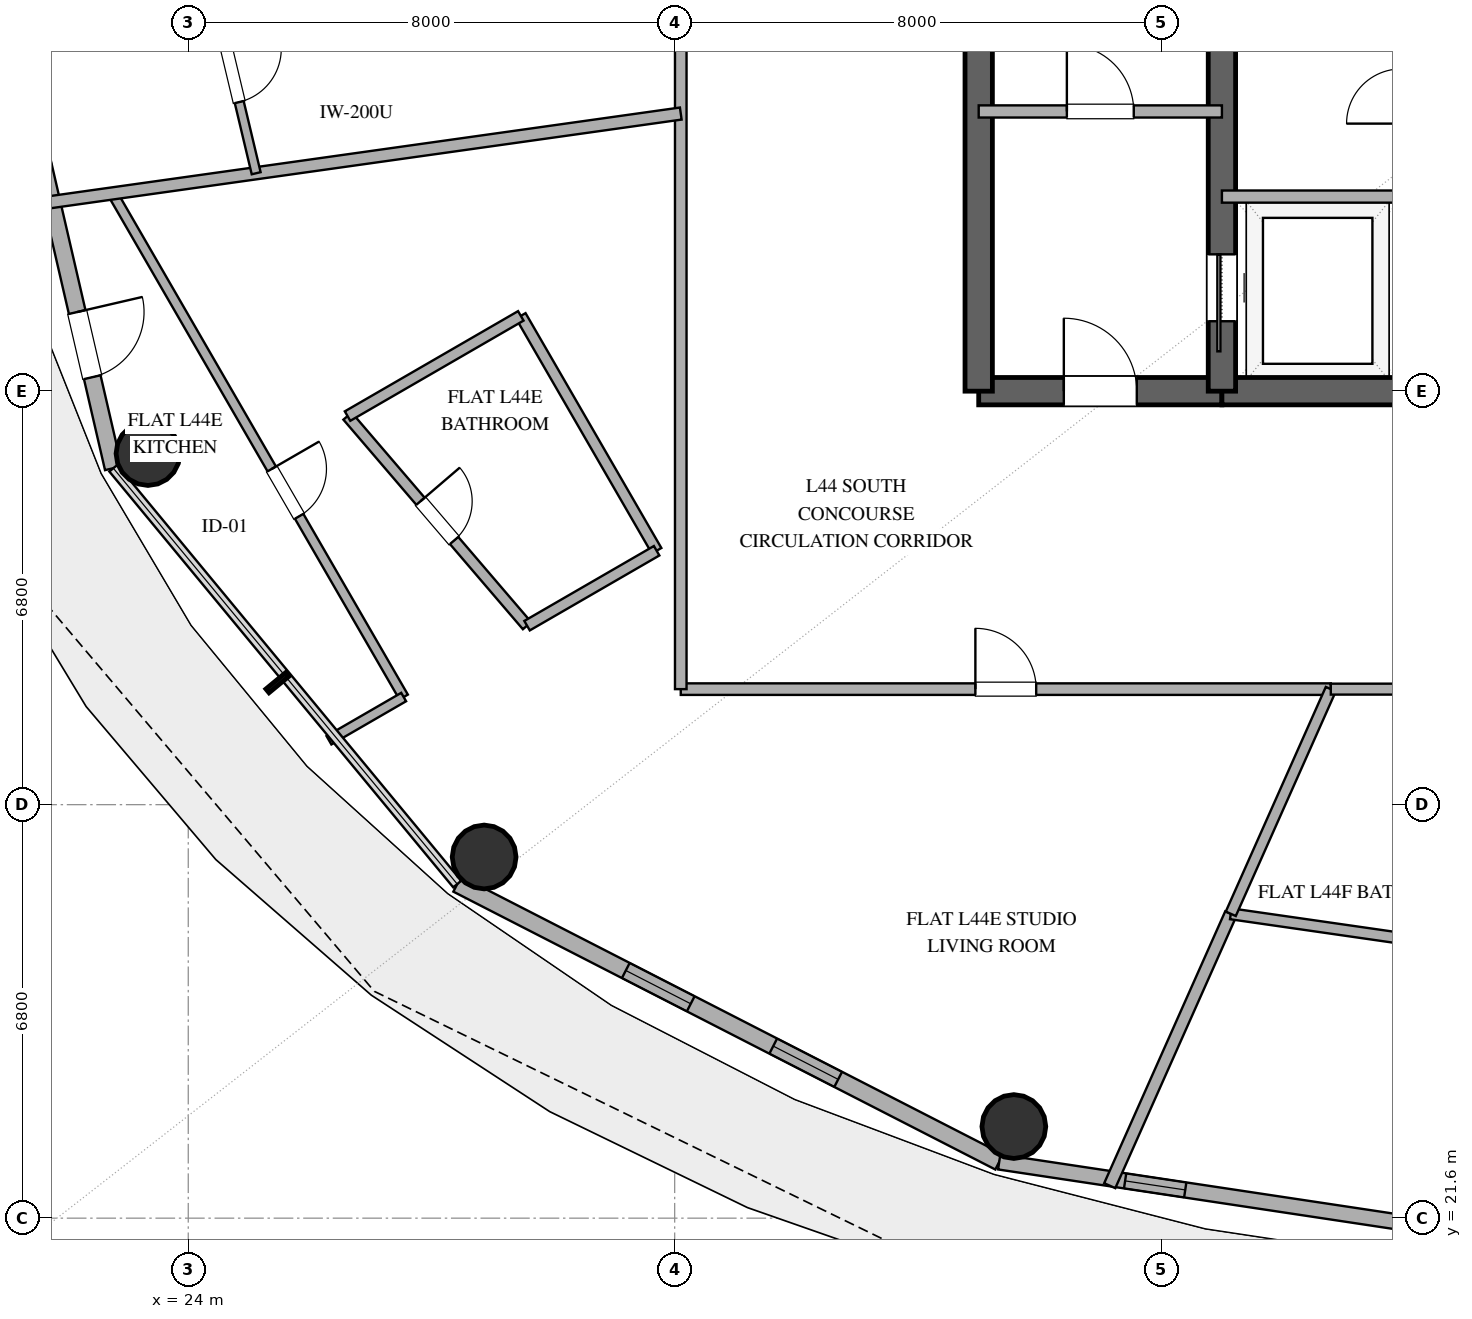
"""IFC4 building model, lengths in metres.
Left out: names, types, materials, properties, quantities, classifications, styles, units other than length and angle.
Written with IfcOpenShell. Run it as: python <this file> out.ifc"""

import sys

from ifc_helpers import new_model, si_unit, direction, frame, frame_2d, origin, origin_2d, place, context, subcontext, project, spatial, rectangle, hollow_circle, extrude, element, fill, save


model = new_model("IFC4")
c1 = context("Model", 3, precision=1e-05, world=origin(), true_north=direction((0.0, 1.0)))
c2 = subcontext(c1, "Body", "Model", "MODEL_VIEW")
j1 = project(units=[si_unit("LENGTHUNIT", "METRE"), si_unit("PLANEANGLEUNIT", "RADIAN")], contexts=[c1])
p1 = place(None, origin())
s1 = spatial("IfcSite", under=j1, at=p1, CompositionType="ELEMENT")
p2 = place(p1, origin())
s2 = spatial("IfcBuilding", under=s1, at=p2, CompositionType="ELEMENT")
p3 = place(p2, frame((0.0, 0.0, 175.8)))
s3 = spatial("IfcBuildingStorey", under=s2, at=p3, CompositionType="ELEMENT", Elevation=175.8)
p4 = place(p3, frame((37.0, 35.2, 0.0), z_axis=(0.0, 0.0, 1.0), x_axis=(1.0, 0.0, 0.0)))
e1 = element("IfcWall", 1, at=p4, inside=s3, PredefinedType="SHEAR", context=c2, shape_type="SweptSolid", body=[
    extrude(rectangle(XDim=4.0, YDim=0.45, at=frame_2d((2.0, 0.0))), origin(), (0.0, 0.0, 1.0), 3.38),
])
p5 = place(p4, frame((1.4, 0.0, 0.0)))
e2 = element("IfcOpeningElement", 2, at=p5, cuts=e1, PredefinedType="OPENING", context=c2, shape_type="SweptSolid", body=[
    extrude(rectangle(XDim=1.2, YDim=2.15, at=frame_2d((0.6, 1.075))), frame((0.0, 0.235, 0.0), z_axis=(0.0, -1.0, 0.0), x_axis=(1.0, 0.0, 0.0)), (0.0, 0.0, 1.0), 0.47),
])
p6 = place(p3, frame((41.0, 35.2, 0.0), z_axis=(0.0, 0.0, 1.0), x_axis=(1.0, 0.0, 0.0)))
e3 = element("IfcWall", 3, at=p6, inside=s3, PredefinedType="SHEAR", context=c2, shape_type="SweptSolid", body=[
    extrude(rectangle(XDim=14.0, YDim=0.45, at=frame_2d((7.0, 0.0))), origin(), (0.0, 0.0, 1.0), 3.38),
])
p7 = place(p6, frame((6.1, 0.0, 0.0)))
e4 = element("IfcOpeningElement", 4, at=p7, cuts=e3, PredefinedType="OPENING", context=c2, shape_type="SweptSolid", body=[
    extrude(rectangle(XDim=1.8, YDim=2.25, at=frame_2d((0.9, 1.125))), frame((0.0, 0.235, 0.0), z_axis=(0.0, -1.0, 0.0), x_axis=(1.0, 0.0, 0.0)), (0.0, 0.0, 1.0), 0.47),
])
p8 = place(p3, frame((37.0, 35.2, 0.0), z_axis=(0.0, 0.0, 1.0), x_axis=(0.0, 1.0, 0.0)))
e5 = element("IfcWall", 5, at=p8, inside=s3, PredefinedType="SHEAR", context=c2, shape_type="SweptSolid", body=[
    extrude(rectangle(XDim=13.6, YDim=0.45, at=frame_2d((6.8, 0.0))), origin(), (0.0, 0.0, 1.0), 3.38),
])
p9 = place(p3, frame((41.0, 35.2, 0.0), z_axis=(0.0, 0.0, 1.0), x_axis=(0.0, 1.0, 0.0)))
e6 = element("IfcWall", 6, at=p9, inside=s3, PredefinedType="SHEAR", context=c2, shape_type="SweptSolid", body=[
    extrude(rectangle(XDim=13.6, YDim=0.45, at=frame_2d((6.8, 0.0))), origin(), (0.0, 0.0, 1.0), 3.38),
])
p10 = place(p9, frame((1.15, 0.0, 0.0)))
e7 = element("IfcOpeningElement", 7, at=p10, cuts=e6, PredefinedType="OPENING", context=c2, shape_type="SweptSolid", body=[
    extrude(rectangle(XDim=1.1, YDim=2.2, at=frame_2d((0.55, 1.1))), frame((0.0, 0.235, 0.0), z_axis=(0.0, -1.0, 0.0), x_axis=(1.0, 0.0, 0.0)), (0.0, 0.0, 1.0), 0.47),
])
for number, where, z_axis, x_axis in (
    (8, (23.338, 34.174, 0.0), (0.0, 0.0, 1.0), (1.0, 0.0, 0.0)),
    (9, (28.866, 27.54, 0.0), (0.0, 0.0, 1.0), (1.0, 0.0, 0.0)),
    (10, (37.578, 23.107, 0.0), (0.0, 0.0, 1.0), (1.0, 0.0, 0.0)),
):
    element("IfcColumn", number, at=place(p3, frame(where, z_axis=z_axis, x_axis=x_axis)), inside=s3, PredefinedType="COLUMN", context=c2, shape_type="SweptSolid", body=[
        extrude(hollow_circle(Radius=0.525, WallThickness=0.028, at=origin_2d()), origin(), (0.0, 0.0, 1.0), 3.38),
    ])
p11 = place(p3, frame((20.901, 42.0, 0.0), z_axis=(0.0, 0.0, 1.0), x_axis=(0.225473184558, -0.974249374157, 0.0)))
e11 = element("IfcWall", 11, at=p11, inside=s3, PredefinedType="SOLIDWALL", context=c2, shape_type="SweptSolid", body=[
    extrude(rectangle(XDim=8.28, YDim=0.28, at=frame_2d((4.14, 0.0))), origin(), (0.0, 0.0, 1.0), 3.38),
])
p12 = place(p11, frame((1.857, 0.0, 0.85)))
e12 = element("IfcOpeningElement", 12, at=p12, cuts=e11, PredefinedType="OPENING", context=c2, shape_type="SweptSolid", body=[
    extrude(rectangle(XDim=1.35, YDim=1.8, at=frame_2d((0.675, 0.9))), frame((0.0, 0.15, 0.0), z_axis=(0.0, -1.0, 0.0), x_axis=(1.0, 0.0, 0.0)), (0.0, 0.0, 1.0), 0.3),
])
p13 = place(p11, frame((5.644, 0.0, 0.0)))
e13 = element("IfcOpeningElement", 13, at=p13, cuts=e11, PredefinedType="OPENING", context=c2, shape_type="SweptSolid", body=[
    extrude(rectangle(XDim=1.1, YDim=2.25, at=frame_2d((0.55, 1.125))), frame((0.0, 0.15, 0.0), z_axis=(0.0, -1.0, 0.0), x_axis=(1.0, 0.0, 0.0)), (0.0, 0.0, 1.0), 0.3),
])
p14 = place(p3, frame((28.424, 27.094, 0.0), z_axis=(0.0, 0.0, 1.0), x_axis=(0.889872523182, -0.456209263919, 0.0)))
e14 = element("IfcWall", 14, at=p14, inside=s3, PredefinedType="SOLIDWALL", context=c2, shape_type="SweptSolid", body=[
    extrude(rectangle(XDim=10.016, YDim=0.28, at=frame_2d((5.008, 0.0))), origin(), (0.0, 0.0, 1.0), 3.38),
])
p15 = place(p14, frame((3.115, 0.0, 0.85)))
e15 = element("IfcOpeningElement", 15, at=p15, cuts=e14, PredefinedType="OPENING", context=c2, shape_type="SweptSolid", body=[
    extrude(rectangle(XDim=1.2, YDim=1.6, at=frame_2d((0.6, 0.8))), frame((0.0, 0.15, 0.0), z_axis=(0.0, -1.0, 0.0), x_axis=(1.0, 0.0, 0.0)), (0.0, 0.0, 1.0), 0.3),
])
p16 = place(p14, frame((5.84, 0.0, 0.85)))
e16 = element("IfcOpeningElement", 16, at=p16, cuts=e14, PredefinedType="OPENING", context=c2, shape_type="SweptSolid", body=[
    extrude(rectangle(XDim=1.2, YDim=1.6, at=frame_2d((0.6, 0.8))), frame((0.0, 0.15, 0.0), z_axis=(0.0, -1.0, 0.0), x_axis=(1.0, 0.0, 0.0)), (0.0, 0.0, 1.0), 0.3),
])
p17 = place(p3, frame((37.337, 22.525, 0.0), z_axis=(0.0, 0.0, 1.0), x_axis=(0.988863993413, -0.148822049884, 0.0)))
e17 = element("IfcWall", 17, at=p17, inside=s3, PredefinedType="SOLIDWALL", context=c2, shape_type="SweptSolid", body=[
    extrude(rectangle(XDim=10.783, YDim=0.25, at=frame_2d((5.392, 0.0))), origin(), (0.0, 0.0, 1.0), 3.38),
])
p18 = place(p17, frame((2.094, 0.0, 1.42)))
e18 = element("IfcOpeningElement", 18, at=p18, cuts=e17, PredefinedType="OPENING", context=c2, shape_type="SweptSolid", body=[
    extrude(rectangle(XDim=1.0, YDim=1.05, at=frame_2d((0.5, 0.525))), frame((0.0, 0.135, 0.0), z_axis=(0.0, -1.0, 0.0), x_axis=(1.0, 0.0, 0.0)), (0.0, 0.0, 1.0), 0.27),
])
p19 = place(p3, frame((37.0, 39.8, 0.0), z_axis=(0.0, 0.0, 1.0), x_axis=(1.0, 0.0, 0.0)))
e19 = element("IfcWall", 19, at=p19, inside=s3, PredefinedType="SOLIDWALL", context=c2, shape_type="SweptSolid", body=[
    extrude(rectangle(XDim=4.0, YDim=0.2, at=frame_2d((2.0, 0.0))), origin(), (0.0, 0.0, 1.0), 2.74),
])
p20 = place(p19, frame((1.45, 0.0, 0.0)))
e20 = element("IfcOpeningElement", 20, at=p20, cuts=e19, PredefinedType="OPENING", context=c2, shape_type="SweptSolid", body=[
    extrude(rectangle(XDim=1.1, YDim=2.15, at=frame_2d((0.55, 1.075))), frame((0.0, 0.11, 0.0), z_axis=(0.0, -1.0, 0.0), x_axis=(1.0, 0.0, 0.0)), (0.0, 0.0, 1.0), 0.22),
])
p21 = place(p3, frame((41.0, 38.4, 0.0), z_axis=(0.0, 0.0, 1.0), x_axis=(1.0, 0.0, 0.0)))
e21 = element("IfcWall", 21, at=p21, inside=s3, PredefinedType="SOLIDWALL", context=c2, shape_type="SweptSolid", body=[
    extrude(rectangle(XDim=2.95, YDim=0.2, at=frame_2d((1.475, 0.0))), origin(), (0.0, 0.0, 1.0), 2.74),
])
p22 = place(p3, frame((32.1, 30.3, 0.0), z_axis=(0.0, 0.0, 1.0), x_axis=(1.0, 0.0, 0.0)))
e22 = element("IfcWall", 22, at=p22, inside=s3, PredefinedType="PARTITIONING", context=c2, shape_type="SweptSolid", body=[
    extrude(rectangle(XDim=10.691, YDim=0.19, at=frame_2d((5.345, 0.0))), origin(), (0.0, 0.0, 1.0), 2.74),
])
p23 = place(p22, frame((4.845, 0.0, 0.0)))
e23 = element("IfcOpeningElement", 23, at=p23, cuts=e22, PredefinedType="OPENING", context=c2, shape_type="SweptSolid", body=[
    extrude(rectangle(XDim=1.0, YDim=2.2, at=frame_2d((0.5, 1.1))), frame((0.0, 0.105, 0.0), z_axis=(0.0, -1.0, 0.0), x_axis=(1.0, 0.0, 0.0)), (0.0, 0.0, 1.0), 0.21),
])
p24 = place(p3, frame((22.753, 38.452, 0.0), z_axis=(0.0, 0.0, 1.0), x_axis=(0.500584533727, -0.865687659952, 0.0)))
e24 = element("IfcWall", 24, at=p24, inside=s3, PredefinedType="PLUMBINGWALL", context=c2, shape_type="SweptSolid", body=[
    extrude(rectangle(XDim=9.567, YDim=0.16, at=frame_2d((4.783, 0.0))), origin(), (0.0, 0.0, 1.0), 2.74),
])
p25 = place(p24, frame((5.233, 0.0, 0.0)))
e25 = element("IfcOpeningElement", 25, at=p25, cuts=e24, PredefinedType="OPENING", context=c2, shape_type="SweptSolid", body=[
    extrude(rectangle(XDim=0.9, YDim=2.1, at=frame_2d((0.45, 1.05))), frame((0.0, 0.09, 0.0), z_axis=(0.0, -1.0, 0.0), x_axis=(1.0, 0.0, 0.0)), (0.0, 0.0, 1.0), 0.18),
])
p26 = place(p3, frame((32.1, 46.593, 0.0), z_axis=(0.0, 0.0, 1.0), x_axis=(0.0, -1.0, 0.0)))
e26 = element("IfcWall", 26, at=p26, inside=s3, PredefinedType="PARTITIONING", context=c2, shape_type="SweptSolid", body=[
    extrude(rectangle(XDim=16.292, YDim=0.19, at=frame_2d((8.146, 0.0))), origin(), (0.0, 0.0, 1.0), 2.74),
])
p27 = place(p3, frame((21.635, 38.295, 0.0), z_axis=(0.0, 0.0, 1.0), x_axis=(0.990268074466, 0.139173060229, 0.0)))
e27 = element("IfcWall", 27, at=p27, inside=s3, PredefinedType="PARTITIONING", context=c2, shape_type="SweptSolid", body=[
    extrude(rectangle(XDim=10.567, YDim=0.2, at=frame_2d((5.284, 0.0))), origin(), (0.0, 0.0, 1.0), 2.74),
])
p28 = place(p3, frame((39.155, 22.134, 0.0), z_axis=(0.0, 0.0, 1.0), x_axis=(0.406740050792, 0.913543940422, 0.0)))
e28 = element("IfcWall", 28, at=p28, inside=s3, PredefinedType="PARTITIONING", context=c2, shape_type="SweptSolid", body=[
    extrude(rectangle(XDim=4.894, YDim=0.2, at=frame_2d((2.447, 0.0))), origin(), (0.0, 0.0, 1.0), 2.74),
])
p29 = place(p3, frame((26.62, 34.79, 0.0), z_axis=(0.0, 0.0, 1.0), x_axis=(0.650507788654, -0.759499583213, 0.0)))
e29 = element("IfcWall", 29, at=p29, inside=s3, PredefinedType="PLUMBINGWALL", context=c2, shape_type="SweptSolid", body=[
    extrude(rectangle(XDim=4.538, YDim=0.18, at=frame_2d((2.269, 0.0))), origin(), (0.0, 0.0, 1.0), 2.74),
])
p30 = place(p29, frame((1.844, 0.0, 0.0)))
e30 = element("IfcOpeningElement", 30, at=p30, cuts=e29, PredefinedType="OPENING", context=c2, shape_type="SweptSolid", body=[
    extrude(rectangle(XDim=0.85, YDim=2.1, at=frame_2d((0.425, 1.05))), frame((0.0, 0.1, 0.0), z_axis=(0.0, -1.0, 0.0), x_axis=(1.0, 0.0, 0.0)), (0.0, 0.0, 1.0), 0.2),
])
p31 = place(p3, frame((31.703, 32.576, 0.0), z_axis=(0.0, 0.0, 1.0), x_axis=(-0.500604830324, 0.865675923112, 0.0)))
e31 = element("IfcWall", 31, at=p31, inside=s3, PredefinedType="PLUMBINGWALL", context=c2, shape_type="SweptSolid", body=[
    extrude(rectangle(XDim=4.462, YDim=0.18, at=frame_2d((2.231, 0.0))), origin(), (0.0, 0.0, 1.0), 2.74),
])
p32 = place(p3, frame((45.366, 25.999, 0.0), z_axis=(0.0, 0.0, 1.0), x_axis=(-0.98982427769, 0.14229511339, 0.0)))
e32 = element("IfcWall", 32, at=p32, inside=s3, PredefinedType="PLUMBINGWALL", context=c2, shape_type="SweptSolid", body=[
    extrude(rectangle(XDim=4.264, YDim=0.18, at=frame_2d((2.132, 0.0))), origin(), (0.0, 0.0, 1.0), 2.74),
])
p33 = place(p3, frame((41.146, 26.605, 0.0), z_axis=(0.0, 0.0, 1.0), x_axis=(0.406732062562, 0.913547497005, 0.0)))
e33 = element("IfcWall", 33, at=p33, inside=s3, PredefinedType="PLUMBINGWALL", context=c2, shape_type="SweptSolid", body=[
    extrude(rectangle(XDim=4.044, YDim=0.18, at=frame_2d((2.022, 0.0))), origin(), (0.0, 0.0, 1.0), 2.74),
])
p34 = place(p3, frame((24.351, 42.0, 0.0), z_axis=(0.0, 0.0, 1.0), x_axis=(0.231590575549, -0.972813345569, 0.0)))
e34 = element("IfcWall", 34, at=p34, inside=s3, PredefinedType="PARTITIONING", context=c2, shape_type="SweptSolid", body=[
    extrude(rectangle(XDim=3.306, YDim=0.15, at=frame_2d((1.653, 0.0))), origin(), (0.0, 0.0, 1.0), 2.74),
])
p35 = place(p34, frame((1.203, 0.0, 0.0)))
e35 = element("IfcOpeningElement", 35, at=p35, cuts=e34, PredefinedType="OPENING", context=c2, shape_type="SweptSolid", body=[
    extrude(rectangle(XDim=0.9, YDim=2.1, at=frame_2d((0.45, 1.05))), frame((0.0, 0.085, 0.0), z_axis=(0.0, -1.0, 0.0), x_axis=(1.0, 0.0, 0.0)), (0.0, 0.0, 1.0), 0.17),
])
p36 = place(p3, frame((29.469, 36.438, 0.0), z_axis=(0.0, 0.0, 1.0), x_axis=(-0.86566653326, -0.500621067469, 0.0)))
e36 = element("IfcWall", 36, at=p36, inside=s3, PredefinedType="PLUMBINGWALL", context=c2, shape_type="SweptSolid", body=[
    extrude(rectangle(XDim=3.292, YDim=0.18, at=frame_2d((1.646, 0.0))), origin(), (0.0, 0.0, 1.0), 2.74),
])
p37 = place(p3, frame((29.572, 31.344, 0.0), z_axis=(0.0, 0.0, 1.0), x_axis=(0.865711329059, 0.500543599239, 0.0)))
e37 = element("IfcWall", 37, at=p37, inside=s3, PredefinedType="PLUMBINGWALL", context=c2, shape_type="SweptSolid", body=[
    extrude(rectangle(XDim=2.462, YDim=0.18, at=frame_2d((1.231, 0.0))), origin(), (0.0, 0.0, 1.0), 2.74),
])
p38 = place(p3, frame((42.791, 30.3, 0.0), z_axis=(0.0, 0.0, 1.0), x_axis=(1.0, 0.0, 0.0)))
e38 = element("IfcWall", 38, at=p38, inside=s3, PredefinedType="PLUMBINGWALL", context=c2, shape_type="SweptSolid", body=[
    extrude(rectangle(XDim=2.082, YDim=0.18, at=frame_2d((1.041, 0.0))), origin(), (0.0, 0.0, 1.0), 2.74),
])
p39 = place(p3, frame((27.542, 30.17, 0.0), z_axis=(0.0, 0.0, 1.0), x_axis=(-0.865626475351, -0.500690328617, 0.0)))
e39 = element("IfcWall", 39, at=p39, inside=s3, PredefinedType="PLUMBINGWALL", context=c2, shape_type="SweptSolid", body=[
    extrude(rectangle(XDim=1.419, YDim=0.16, at=frame_2d((0.709, 0.0))), origin(), (0.0, 0.0, 1.0), 2.74),
])
p40 = place(p13, origin())
e40 = element("IfcDoor", 40, at=p40, inside=s3, OperationType="SINGLE_SWING_LEFT", PredefinedType="DOOR", context=c2, shape_type="SweptSolid", body=[
    extrude(rectangle(XDim=1.1, YDim=2.25, at=frame_2d((0.55, 1.125))), frame((0.0, 0.025, 0.0), z_axis=(0.0, -1.0, 0.0), x_axis=(1.0, 0.0, 0.0)), (0.0, 0.0, 1.0), 0.05),
])
fill(e13, e40)
p41 = place(p15, origin())
e41 = element("IfcWindow", 41, at=p41, inside=s3, PartitioningType="SINGLE_PANEL", PredefinedType="WINDOW", context=c2, shape_type="SweptSolid", body=[
    extrude(rectangle(XDim=1.2, YDim=1.6, at=frame_2d((0.6, 0.8))), frame((0.0, 0.03, 0.0), z_axis=(0.0, -1.0, 0.0), x_axis=(1.0, 0.0, 0.0)), (0.0, 0.0, 1.0), 0.06),
])
fill(e15, e41)
p42 = place(p16, origin())
e42 = element("IfcWindow", 42, at=p42, inside=s3, PartitioningType="SINGLE_PANEL", PredefinedType="WINDOW", context=c2, shape_type="SweptSolid", body=[
    extrude(rectangle(XDim=1.2, YDim=1.6, at=frame_2d((0.6, 0.8))), frame((0.0, 0.03, 0.0), z_axis=(0.0, -1.0, 0.0), x_axis=(1.0, 0.0, 0.0)), (0.0, 0.0, 1.0), 0.06),
])
fill(e16, e42)
p43 = place(p18, origin())
e43 = element("IfcWindow", 43, at=p43, inside=s3, PartitioningType="SINGLE_PANEL", PredefinedType="WINDOW", context=c2, shape_type="SweptSolid", body=[
    extrude(rectangle(XDim=1.0, YDim=1.05, at=frame_2d((0.5, 0.525))), frame((0.0, 0.03, 0.0), z_axis=(0.0, -1.0, 0.0), x_axis=(1.0, 0.0, 0.0)), (0.0, 0.0, 1.0), 0.06),
])
fill(e18, e43)
p44 = place(p10, origin())
e44 = element("IfcDoor", 44, at=p44, inside=s3, OperationType="SLIDING_TO_LEFT", PredefinedType="DOOR", context=c2, shape_type="SweptSolid", body=[
    extrude(rectangle(XDim=1.1, YDim=2.2, at=frame_2d((0.55, 1.1))), frame((0.0, 0.025, 0.0), z_axis=(0.0, -1.0, 0.0), x_axis=(1.0, 0.0, 0.0)), (0.0, 0.0, 1.0), 0.05),
])
fill(e7, e44)
p45 = place(p5, origin())
e45 = element("IfcDoor", 45, at=p45, inside=s3, OperationType="SINGLE_SWING_LEFT", PredefinedType="DOOR", context=c2, shape_type="SweptSolid", body=[
    extrude(rectangle(XDim=1.2, YDim=2.15, at=frame_2d((0.6, 1.075))), frame((0.0, 0.025, 0.0), z_axis=(0.0, -1.0, 0.0), x_axis=(1.0, 0.0, 0.0)), (0.0, 0.0, 1.0), 0.05),
])
fill(e2, e45)
p46 = place(p20, origin())
e46 = element("IfcDoor", 46, at=p46, inside=s3, OperationType="SINGLE_SWING_LEFT", PredefinedType="DOOR", context=c2, shape_type="SweptSolid", body=[
    extrude(rectangle(XDim=1.1, YDim=2.15, at=frame_2d((0.55, 1.075))), frame((0.0, 0.025, 0.0), z_axis=(0.0, -1.0, 0.0), x_axis=(1.0, 0.0, 0.0)), (0.0, 0.0, 1.0), 0.05),
])
fill(e20, e46)
p47 = place(p23, origin())
e47 = element("IfcDoor", 47, at=p47, inside=s3, OperationType="SINGLE_SWING_LEFT", PredefinedType="DOOR", context=c2, shape_type="SweptSolid", body=[
    extrude(rectangle(XDim=1.0, YDim=2.2, at=frame_2d((0.5, 1.1))), frame((0.0, 0.025, 0.0), z_axis=(0.0, -1.0, 0.0), x_axis=(1.0, 0.0, 0.0)), (0.0, 0.0, 1.0), 0.05),
])
fill(e23, e47)
p48 = place(p25, origin())
e48 = element("IfcDoor", 48, at=p48, inside=s3, OperationType="SINGLE_SWING_LEFT", PredefinedType="DOOR", context=c2, shape_type="SweptSolid", body=[
    extrude(rectangle(XDim=0.9, YDim=2.1, at=frame_2d((0.45, 1.05))), frame((0.0, 0.025, 0.0), z_axis=(0.0, -1.0, 0.0), x_axis=(1.0, 0.0, 0.0)), (0.0, 0.0, 1.0), 0.05),
])
fill(e25, e48)
p49 = place(p30, origin())
e49 = element("IfcDoor", 49, at=p49, inside=s3, OperationType="SINGLE_SWING_LEFT", PredefinedType="DOOR", context=c2, shape_type="SweptSolid", body=[
    extrude(rectangle(XDim=0.85, YDim=2.1, at=frame_2d((0.425, 1.05))), frame((0.0, 0.025, 0.0), z_axis=(0.0, -1.0, 0.0), x_axis=(1.0, 0.0, 0.0)), (0.0, 0.0, 1.0), 0.05),
])
fill(e30, e49)
p50 = place(p35, origin())
e50 = element("IfcDoor", 50, at=p50, inside=s3, OperationType="SINGLE_SWING_LEFT", PredefinedType="DOOR", context=c2, shape_type="SweptSolid", body=[
    extrude(rectangle(XDim=0.9, YDim=2.1, at=frame_2d((0.45, 1.05))), frame((0.0, 0.025, 0.0), z_axis=(0.0, -1.0, 0.0), x_axis=(1.0, 0.0, 0.0)), (0.0, 0.0, 1.0), 0.05),
])
fill(e35, e50)
save(model, sys.argv[1])
